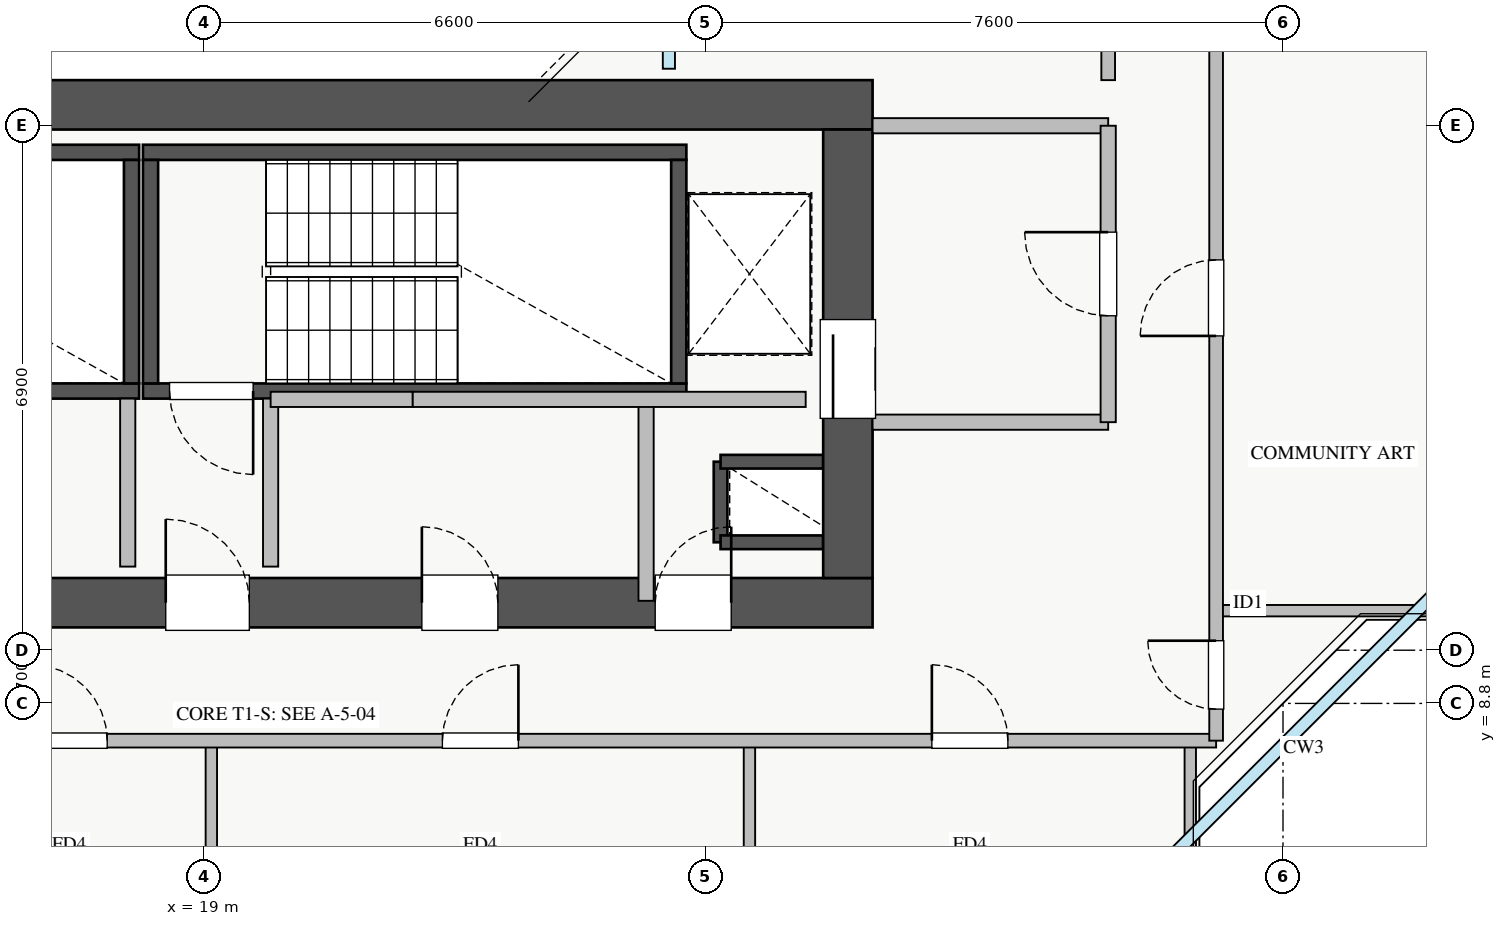
"""IFC4 building model, lengths in metres.
Left out: names, types, materials, properties, quantities, classifications, styles, units other than length and angle.
Written with IfcOpenShell. Run it as: python <this file> out.ifc"""

import sys

from ifc_helpers import new_model, si_unit, direction, frame, frame_2d, origin, place, context, subcontext, project, spatial, rectangle, extrude, source, transform, mapped, element, fill, save


model = new_model("IFC4")
c1 = context("Model", 3, precision=1e-05, world=origin(), true_north=direction((0.0, 1.0)))
c2 = subcontext(c1, "Body", "Model", "MODEL_VIEW")
j1 = project(units=[si_unit("LENGTHUNIT", "METRE"), si_unit("PLANEANGLEUNIT", "RADIAN")], contexts=[c1])
p1 = place(None, origin())
s1 = spatial("IfcSite", under=j1, at=p1, CompositionType="ELEMENT")
p2 = place(p1, origin())
s2 = spatial("IfcBuilding", under=s1, at=p2, CompositionType="ELEMENT")
p3 = place(p2, frame((0.0, 0.0, 176.25)))
s3 = spatial("IfcBuildingStorey", under=s2, at=p3, CompositionType="ELEMENT", Elevation=176.25)
p4 = place(p3, frame((25.8, 10.92, 0.0), z_axis=(0.0, 0.0, 1.0), x_axis=(0.0, 1.0, 0.0)))
e1 = element("IfcWall", 1, at=p4, inside=s3, PredefinedType="SHEAR", context=c2, shape_type="SweptSolid", body=[
    extrude(rectangle(XDim=1.06, YDim=0.18, at=frame_2d((0.53, 0.0))), origin(), (0.0, 0.0, 1.0), 3.07),
])
for number, where, z_axis, x_axis in (
    (2, (25.8, 11.98, 0.0), (0.0, 0.0, 1.0), (1.0, 0.0, 0.0)),
    (3, (25.8, 10.92, 0.0), (0.0, 0.0, 1.0), (1.0, 0.0, 0.0)),
):
    element("IfcWall", number, at=place(p3, frame(where, z_axis=z_axis, x_axis=x_axis)), inside=s3, PredefinedType="SHEAR", context=c2, shape_type="SweptSolid", body=[
        extrude(rectangle(XDim=1.35, YDim=0.18, at=frame_2d((0.675, 0.0))), origin(), (0.0, 0.0, 1.0), 3.07),
    ])
p5 = place(p3, frame((10.85, 12.91, 0.0), z_axis=(0.0, 0.0, 1.0), x_axis=(1.0, 0.0, 0.0)))
e4 = element("IfcWall", 4, at=p5, inside=s3, PredefinedType="SHEAR", context=c2, shape_type="SweptSolid", body=[
    extrude(rectangle(XDim=7.3, YDim=0.2, at=frame_2d((3.65, 0.0))), origin(), (0.0, 0.0, 1.0), 3.25),
])
p6 = place(p5, frame((0.35, 0.0, 0.0)))
e5 = element("IfcOpeningElement", 5, at=p6, cuts=e4, PredefinedType="OPENING", context=c2, shape_type="SweptSolid", body=[
    extrude(rectangle(XDim=1.1, YDim=2.05, at=frame_2d((0.55, 1.025))), frame((0.0, 0.11, 0.0), z_axis=(0.0, -1.0, 0.0), x_axis=(1.0, 0.0, 0.0)), (0.0, 0.0, 1.0), 0.22),
])
p7 = place(p3, frame((10.85, 16.05, 0.0), z_axis=(0.0, 0.0, 1.0), x_axis=(1.0, 0.0, 0.0)))
e6 = element("IfcWall", 6, at=p7, inside=s3, PredefinedType="SHEAR", context=c2, shape_type="SweptSolid", body=[
    extrude(rectangle(XDim=7.3, YDim=0.2, at=frame_2d((3.65, 0.0))), origin(), (0.0, 0.0, 1.0), 3.25),
])
p8 = place(p3, frame((18.05, 13.01, 0.0), z_axis=(0.0, 0.0, 1.0), x_axis=(0.0, 1.0, 0.0)))
e7 = element("IfcWall", 7, at=p8, inside=s3, PredefinedType="SHEAR", context=c2, shape_type="SweptSolid", body=[
    extrude(rectangle(XDim=2.94, YDim=0.2, at=frame_2d((1.47, 0.0))), origin(), (0.0, 0.0, 1.0), 3.25),
])
p9 = place(p3, frame((18.2, 12.91, 0.0), z_axis=(0.0, 0.0, 1.0), x_axis=(1.0, 0.0, 0.0)))
e8 = element("IfcWall", 8, at=p9, inside=s3, PredefinedType="SHEAR", context=c2, shape_type="SweptSolid", body=[
    extrude(rectangle(XDim=7.15, YDim=0.2, at=frame_2d((3.575, 0.0))), origin(), (0.0, 0.0, 1.0), 3.25),
])
p10 = place(p9, frame((0.35, 0.0, 0.0)))
e9 = element("IfcOpeningElement", 9, at=p10, cuts=e8, PredefinedType="OPENING", context=c2, shape_type="SweptSolid", body=[
    extrude(rectangle(XDim=1.1, YDim=2.05, at=frame_2d((0.55, 1.025))), frame((0.0, 0.11, 0.0), z_axis=(0.0, -1.0, 0.0), x_axis=(1.0, 0.0, 0.0)), (0.0, 0.0, 1.0), 0.22),
])
p11 = place(p3, frame((18.2, 16.05, 0.0), z_axis=(0.0, 0.0, 1.0), x_axis=(1.0, 0.0, 0.0)))
e10 = element("IfcWall", 10, at=p11, inside=s3, PredefinedType="SHEAR", context=c2, shape_type="SweptSolid", body=[
    extrude(rectangle(XDim=7.15, YDim=0.2, at=frame_2d((3.575, 0.0))), origin(), (0.0, 0.0, 1.0), 3.25),
])
for number, where, z_axis, x_axis in (
    (11, (18.3, 13.01, 0.0), (0.0, 0.0, 1.0), (0.0, 1.0, 0.0)),
    (12, (25.25, 13.01, 0.0), (0.0, 0.0, 1.0), (0.0, 1.0, 0.0)),
):
    element("IfcWall", number, at=place(p3, frame(where, z_axis=z_axis, x_axis=x_axis)), inside=s3, PredefinedType="SHEAR", context=c2, shape_type="SweptSolid", body=[
        extrude(rectangle(XDim=2.94, YDim=0.2, at=frame_2d((1.47, 0.0))), origin(), (0.0, 0.0, 1.0), 3.25),
    ])
p12 = place(p3, frame((10.2, 10.125, 0.0), z_axis=(0.0, 0.0, 1.0), x_axis=(1.0, 0.0, 0.0)))
e13 = element("IfcWall", 13, at=p12, inside=s3, PredefinedType="SHEAR", context=c2, shape_type="SweptSolid", body=[
    extrude(rectangle(XDim=17.6, YDim=0.65, at=frame_2d((8.8, 0.0))), origin(), (0.0, 0.0, 1.0), 3.25),
])
p13 = place(p12, frame((1.15, 0.0, 0.0)))
e14 = element("IfcOpeningElement", 14, at=p13, cuts=e13, PredefinedType="OPENING", context=c2, shape_type="SweptSolid", body=[
    extrude(rectangle(XDim=1.1, YDim=2.05, at=frame_2d((0.55, 1.025))), frame((0.0, 0.335, 0.0), z_axis=(0.0, -1.0, 0.0), x_axis=(1.0, 0.0, 0.0)), (0.0, 0.0, 1.0), 0.67),
])
p14 = place(p12, frame((8.3, 0.0, 0.0)))
e15 = element("IfcOpeningElement", 15, at=p14, cuts=e13, PredefinedType="OPENING", context=c2, shape_type="SweptSolid", body=[
    extrude(rectangle(XDim=1.1, YDim=2.05, at=frame_2d((0.55, 1.025))), frame((0.0, 0.335, 0.0), z_axis=(0.0, -1.0, 0.0), x_axis=(1.0, 0.0, 0.0)), (0.0, 0.0, 1.0), 0.67),
])
p15 = place(p12, frame((4.9, 0.0, 0.0)))
e16 = element("IfcOpeningElement", 16, at=p15, cuts=e13, PredefinedType="OPENING", context=c2, shape_type="SweptSolid", body=[
    extrude(rectangle(XDim=1.1, YDim=2.05, at=frame_2d((0.55, 1.025))), frame((0.0, 0.335, 0.0), z_axis=(0.0, -1.0, 0.0), x_axis=(1.0, 0.0, 0.0)), (0.0, 0.0, 1.0), 0.67),
])
p16 = place(p12, frame((14.74, 0.0, 0.0)))
e17 = element("IfcOpeningElement", 17, at=p16, cuts=e13, PredefinedType="OPENING", context=c2, shape_type="SweptSolid", body=[
    extrude(rectangle(XDim=1.0, YDim=2.05, at=frame_2d((0.5, 1.025))), frame((0.0, 0.335, 0.0), z_axis=(0.0, -1.0, 0.0), x_axis=(1.0, 0.0, 0.0)), (0.0, 0.0, 1.0), 0.67),
])
p17 = place(p12, frame((11.67, 0.0, 0.0)))
e18 = element("IfcOpeningElement", 18, at=p17, cuts=e13, PredefinedType="OPENING", context=c2, shape_type="SweptSolid", body=[
    extrude(rectangle(XDim=1.0, YDim=2.05, at=frame_2d((0.5, 1.025))), frame((0.0, 0.335, 0.0), z_axis=(0.0, -1.0, 0.0), x_axis=(1.0, 0.0, 0.0)), (0.0, 0.0, 1.0), 0.67),
])
p18 = place(p3, frame((10.2, 16.675, 0.0), z_axis=(0.0, 0.0, 1.0), x_axis=(1.0, 0.0, 0.0)))
e19 = element("IfcWall", 19, at=p18, inside=s3, PredefinedType="SHEAR", context=c2, shape_type="SweptSolid", body=[
    extrude(rectangle(XDim=17.6, YDim=0.65, at=frame_2d((8.8, 0.0))), origin(), (0.0, 0.0, 1.0), 3.25),
])
p19 = place(p3, frame((27.475, 10.45, 0.0), z_axis=(0.0, 0.0, 1.0), x_axis=(0.0, 1.0, 0.0)))
e20 = element("IfcWall", 20, at=p19, inside=s3, PredefinedType="SHEAR", context=c2, shape_type="SweptSolid", body=[
    extrude(rectangle(XDim=5.9, YDim=0.65, at=frame_2d((2.95, 0.0))), origin(), (0.0, 0.0, 1.0), 3.25),
])
p20 = place(p19, frame((2.1, 0.0, 0.0)))
e21 = element("IfcOpeningElement", 21, at=p20, cuts=e20, PredefinedType="OPENING", context=c2, shape_type="SweptSolid", body=[
    extrude(rectangle(XDim=1.3, YDim=2.05, at=frame_2d((0.65, 1.025))), frame((0.0, 0.335, 0.0), z_axis=(0.0, -1.0, 0.0), x_axis=(1.0, 0.0, 0.0)), (0.0, 0.0, 1.0), 0.67),
])
for number, where, z_axis, x_axis in (
    (22, (27.8, 16.4, 0.0), (0.0, 0.0, 1.0), (1.0, 0.0, 0.0)),
    (23, (27.8, 12.5, 0.0), (0.0, 0.0, 1.0), (1.0, 0.0, 0.0)),
):
    element("IfcWall", number, at=place(p3, frame(where, z_axis=z_axis, x_axis=x_axis)), inside=s3, PredefinedType="PARTITIONING", context=c2, shape_type="SweptSolid", body=[
        extrude(rectangle(XDim=3.1, YDim=0.2, at=frame_2d((1.55, 0.0))), origin(), (0.0, 0.0, 1.0), 3.07),
    ])
p21 = place(p3, frame((30.9, 12.5, 0.0), z_axis=(0.0, 0.0, 1.0), x_axis=(0.0, 1.0, 0.0)))
e24 = element("IfcWall", 24, at=p21, inside=s3, PredefinedType="PARTITIONING", context=c2, shape_type="SweptSolid", body=[
    extrude(rectangle(XDim=3.9, YDim=0.2, at=frame_2d((1.95, 0.0))), origin(), (0.0, 0.0, 1.0), 3.07),
])
p22 = place(p21, frame((1.4, 0.0, 0.0)))
e25 = element("IfcOpeningElement", 25, at=p22, cuts=e24, PredefinedType="OPENING", context=c2, shape_type="SweptSolid", body=[
    extrude(rectangle(XDim=1.1, YDim=2.05, at=frame_2d((0.55, 1.025))), frame((0.0, 0.11, 0.0), z_axis=(0.0, -1.0, 0.0), x_axis=(1.0, 0.0, 0.0)), (0.0, 0.0, 1.0), 0.22),
])
for number, where, z_axis, x_axis in (
    (26, (18.0, 10.6, 0.0), (0.0, 0.0, 1.0), (0.0, 1.0, 0.0)),
    (27, (19.88, 10.6, 0.0), (0.0, 0.0, 1.0), (0.0, 1.0, 0.0)),
):
    element("IfcWall", number, at=place(p3, frame(where, z_axis=z_axis, x_axis=x_axis)), inside=s3, PredefinedType="PARTITIONING", context=c2, shape_type="SweptSolid", body=[
        extrude(rectangle(XDim=2.21, YDim=0.2, at=frame_2d((1.105, 0.0))), origin(), (0.0, 0.0, 1.0), 3.07),
    ])
p23 = place(p3, frame((24.82, 10.15, 0.0), z_axis=(0.0, 0.0, 1.0), x_axis=(0.0, 1.0, 0.0)))
e28 = element("IfcWall", 28, at=p23, inside=s3, PredefinedType="PARTITIONING", context=c2, shape_type="SweptSolid", body=[
    extrude(rectangle(XDim=2.65, YDim=0.2, at=frame_2d((1.325, 0.0))), origin(), (0.0, 0.0, 1.0), 3.07),
])
p24 = place(p3, frame((19.88, 12.8, 0.0), z_axis=(0.0, 0.0, 1.0), x_axis=(1.0, 0.0, 0.0)))
e29 = element("IfcWall", 29, at=p24, inside=s3, PredefinedType="PARTITIONING", context=c2, shape_type="SweptSolid", body=[
    extrude(rectangle(XDim=1.87, YDim=0.2, at=frame_2d((0.935, 0.0))), origin(), (0.0, 0.0, 1.0), 3.07),
])
p25 = place(p3, frame((21.75, 12.8, 0.0), z_axis=(0.0, 0.0, 1.0), x_axis=(1.0, 0.0, 0.0)))
e30 = element("IfcWall", 30, at=p25, inside=s3, PredefinedType="PARTITIONING", context=c2, shape_type="SweptSolid", body=[
    extrude(rectangle(XDim=5.17, YDim=0.2, at=frame_2d((2.585, 0.0))), origin(), (0.0, 0.0, 1.0), 3.07),
])
p26 = place(p3, frame((19.1, 5.35, 0.0), z_axis=(0.0, 0.0, 1.0), x_axis=(0.0, 1.0, 0.0)))
e31 = element("IfcWall", 31, at=p26, inside=s3, PredefinedType="PARTITIONING", context=c2, shape_type="SweptSolid", body=[
    extrude(rectangle(XDim=2.96, YDim=0.15, at=frame_2d((1.48, 0.0))), origin(), (0.0, 0.0, 1.0), 2.815),
])
for number, where, z_axis, x_axis in (
    (32, (26.18, 5.35, 0.0), (0.0, 0.0, 1.0), (0.0, 1.0, 0.0)),
    (33, (31.98, 5.35, 0.0), (0.0, 0.0, 1.0), (0.0, 1.0, 0.0)),
):
    element("IfcWall", number, at=place(p3, frame(where, z_axis=z_axis, x_axis=x_axis)), inside=s3, PredefinedType="PARTITIONING", context=c2, shape_type="SweptSolid", body=[
        extrude(rectangle(XDim=2.96, YDim=0.15, at=frame_2d((1.48, 0.0))), origin(), (0.0, 0.0, 1.0), 3.07),
    ])
p27 = place(p3, frame((8.78, 8.31, 0.0), z_axis=(0.0, 0.0, 1.0), x_axis=(1.0, 0.0, 0.0)))
e34 = element("IfcWall", 34, at=p27, inside=s3, PredefinedType="PARTITIONING", context=c2, shape_type="SweptSolid", body=[
    extrude(rectangle(XDim=23.54, YDim=0.18, at=frame_2d((11.77, 0.0))), origin(), (0.0, 0.0, 1.0), 3.07),
])
p28 = place(p27, frame((2.79, 0.0, 0.0)))
e35 = element("IfcOpeningElement", 35, at=p28, cuts=e34, PredefinedType="OPENING", context=c2, shape_type="SweptSolid", body=[
    extrude(rectangle(XDim=1.0, YDim=2.05, at=frame_2d((0.5, 1.025))), frame((0.0, 0.1, 0.0), z_axis=(0.0, -1.0, 0.0), x_axis=(1.0, 0.0, 0.0)), (0.0, 0.0, 1.0), 0.2),
])
p29 = place(p27, frame((7.95, 0.0, 0.0)))
e36 = element("IfcOpeningElement", 36, at=p29, cuts=e34, PredefinedType="OPENING", context=c2, shape_type="SweptSolid", body=[
    extrude(rectangle(XDim=1.0, YDim=2.05, at=frame_2d((0.5, 1.025))), frame((0.0, 0.1, 0.0), z_axis=(0.0, -1.0, 0.0), x_axis=(1.0, 0.0, 0.0)), (0.0, 0.0, 1.0), 0.2),
])
p30 = place(p27, frame((13.36, 0.0, 0.0)))
e37 = element("IfcOpeningElement", 37, at=p30, cuts=e34, PredefinedType="OPENING", context=c2, shape_type="SweptSolid", body=[
    extrude(rectangle(XDim=1.0, YDim=2.05, at=frame_2d((0.5, 1.025))), frame((0.0, 0.1, 0.0), z_axis=(0.0, -1.0, 0.0), x_axis=(1.0, 0.0, 0.0)), (0.0, 0.0, 1.0), 0.2),
])
p31 = place(p27, frame((19.8, 0.0, 0.0)))
e38 = element("IfcOpeningElement", 38, at=p31, cuts=e34, PredefinedType="OPENING", context=c2, shape_type="SweptSolid", body=[
    extrude(rectangle(XDim=1.0, YDim=2.05, at=frame_2d((0.5, 1.025))), frame((0.0, 0.1, 0.0), z_axis=(0.0, -1.0, 0.0), x_axis=(1.0, 0.0, 0.0)), (0.0, 0.0, 1.0), 0.2),
])
p32 = place(p3, frame((32.32, 10.02, 0.0), z_axis=(0.0, 0.0, 1.0), x_axis=(1.0, 0.0, 0.0)))
e39 = element("IfcWall", 39, at=p32, inside=s3, PredefinedType="PARTITIONING", context=c2, shape_type="SweptSolid", body=[
    extrude(rectangle(XDim=3.28, YDim=0.15, at=frame_2d((1.64, 0.0))), origin(), (0.0, 0.0, 1.0), 3.07),
])
p33 = place(p3, frame((32.32, 8.31, 0.0), z_axis=(0.0, 0.0, 1.0), x_axis=(0.0, 1.0, 0.0)))
e40 = element("IfcWall", 40, at=p33, inside=s3, PredefinedType="PARTITIONING", context=c2, shape_type="SweptSolid", body=[
    extrude(rectangle(XDim=29.34, YDim=0.18, at=frame_2d((14.67, 0.0))), origin(), (0.0, 0.0, 1.0), 3.07),
])
p34 = place(p33, frame((28.045, 0.0, 0.0)))
e41 = element("IfcOpeningElement", 41, at=p34, cuts=e40, PredefinedType="OPENING", context=c2, shape_type="SweptSolid", body=[
    extrude(rectangle(XDim=0.9, YDim=2.05, at=frame_2d((0.45, 1.025))), frame((0.0, 0.1, 0.0), z_axis=(0.0, -1.0, 0.0), x_axis=(1.0, 0.0, 0.0)), (0.0, 0.0, 1.0), 0.2),
])
p35 = place(p33, frame((0.415, 0.0, 0.0)))
e42 = element("IfcOpeningElement", 42, at=p35, cuts=e40, PredefinedType="OPENING", context=c2, shape_type="SweptSolid", body=[
    extrude(rectangle(XDim=0.9, YDim=2.05, at=frame_2d((0.45, 1.025))), frame((0.0, 0.1, 0.0), z_axis=(0.0, -1.0, 0.0), x_axis=(1.0, 0.0, 0.0)), (0.0, 0.0, 1.0), 0.2),
])
p36 = place(p33, frame((5.325, 0.0, 0.0)))
e43 = element("IfcOpeningElement", 43, at=p36, cuts=e40, PredefinedType="OPENING", context=c2, shape_type="SweptSolid", body=[
    extrude(rectangle(XDim=1.0, YDim=2.05, at=frame_2d((0.5, 1.025))), frame((0.0, 0.1, 0.0), z_axis=(0.0, -1.0, 0.0), x_axis=(1.0, 0.0, 0.0)), (0.0, 0.0, 1.0), 0.2),
])
p37 = place(p33, frame((14.095, 0.0, 0.0)))
e44 = element("IfcOpeningElement", 44, at=p37, cuts=e40, PredefinedType="OPENING", context=c2, shape_type="SweptSolid", body=[
    extrude(rectangle(XDim=1.0, YDim=2.05, at=frame_2d((0.5, 1.025))), frame((0.0, 0.1, 0.0), z_axis=(0.0, -1.0, 0.0), x_axis=(1.0, 0.0, 0.0)), (0.0, 0.0, 1.0), 0.2),
])
p38 = place(p33, frame((22.96, 0.0, 0.0)))
e45 = element("IfcOpeningElement", 45, at=p38, cuts=e40, PredefinedType="OPENING", context=c2, shape_type="SweptSolid", body=[
    extrude(rectangle(XDim=1.0, YDim=2.05, at=frame_2d((0.5, 1.025))), frame((0.0, 0.1, 0.0), z_axis=(0.0, -1.0, 0.0), x_axis=(1.0, 0.0, 0.0)), (0.0, 0.0, 1.0), 0.2),
])
p39 = place(p3, frame((30.9, 17.0, 0.0), z_axis=(0.0, 0.0, 1.0), x_axis=(0.0, 1.0, 0.0)))
e46 = element("IfcWall", 46, at=p39, inside=s3, PredefinedType="PARTITIONING", context=c2, shape_type="SweptSolid", body=[
    extrude(rectangle(XDim=12.0, YDim=0.18, at=frame_2d((6.0, 0.0))), origin(), (0.0, 0.0, 1.0), 3.07),
])
p40 = place(p39, frame((2.36, 0.0, 0.0)))
e47 = element("IfcOpeningElement", 47, at=p40, cuts=e46, PredefinedType="OPENING", context=c2, shape_type="SweptSolid", body=[
    extrude(rectangle(XDim=1.0, YDim=2.05, at=frame_2d((0.5, 1.025))), frame((0.0, 0.1, 0.0), z_axis=(0.0, -1.0, 0.0), x_axis=(1.0, 0.0, 0.0)), (0.0, 0.0, 1.0), 0.2),
])
m1 = source(origin(), c2, "Body", "SweptSolid", [
    extrude(rectangle(XDim=1.3, YDim=2.05, at=frame_2d((0.65, 1.025))), frame((0.0, 0.025, 0.0), z_axis=(0.0, -1.0, 0.0), x_axis=(1.0, 0.0, 0.0)), (0.0, 0.0, 1.0), 0.05),
])
p41 = place(p20, origin())
e48 = element("IfcDoor", 48, at=p41, inside=s3, OperationType="SLIDING_TO_RIGHT", PredefinedType="DOOR", context=c2, shape_type="MappedRepresentation", body=[
    mapped(m1, transform((0.0, 0.0, 0.0), x_axis=(1.0, 0.0, 0.0), y_axis=(0.0, 1.0, 0.0), z_axis=(0.0, 0.0, 1.0), scale=1.0)),
])
fill(e21, e48)
m2 = source(origin(), c2, "Body", "SweptSolid", [
    extrude(rectangle(XDim=1.1, YDim=2.05, at=frame_2d((0.55, 1.025))), frame((0.0, 0.025, 0.0), z_axis=(0.0, -1.0, 0.0), x_axis=(1.0, 0.0, 0.0)), (0.0, 0.0, 1.0), 0.05),
])
p42 = place(p14, origin())
e49 = element("IfcDoor", 49, at=p42, inside=s3, OperationType="SINGLE_SWING_LEFT", PredefinedType="DOOR", context=c2, shape_type="MappedRepresentation", body=[
    mapped(m2, transform((0.0, 0.0, 0.0), x_axis=(1.0, 0.0, 0.0), y_axis=(0.0, 1.0, 0.0), z_axis=(0.0, 0.0, 1.0), scale=1.0)),
])
fill(e15, e49)
p43 = place(p10, frame((1.1, 0.0, 0.0), z_axis=(0.0, 0.0, 1.0), x_axis=(-1.0, 0.0, 0.0)))
e50 = element("IfcDoor", 50, at=p43, inside=s3, OperationType="SINGLE_SWING_RIGHT", PredefinedType="DOOR", context=c2, shape_type="MappedRepresentation", body=[
    mapped(m2, transform((0.0, 0.0, 0.0), x_axis=(1.0, 0.0, 0.0), y_axis=(0.0, 1.0, 0.0), z_axis=(0.0, 0.0, 1.0), scale=1.0)),
])
fill(e9, e50)
m3 = source(origin(), c2, "Body", "SweptSolid", [
    extrude(rectangle(XDim=1.0, YDim=2.05, at=frame_2d((0.5, 1.025))), frame((0.0, 0.025, 0.0), z_axis=(0.0, -1.0, 0.0), x_axis=(1.0, 0.0, 0.0)), (0.0, 0.0, 1.0), 0.05),
])
p44 = place(p16, origin())
e51 = element("IfcDoor", 51, at=p44, inside=s3, OperationType="SINGLE_SWING_RIGHT", PredefinedType="DOOR", context=c2, shape_type="MappedRepresentation", body=[
    mapped(m3, transform((0.0, 0.0, 0.0), x_axis=(1.0, 0.0, 0.0), y_axis=(0.0, 1.0, 0.0), z_axis=(0.0, 0.0, 1.0), scale=1.0)),
])
fill(e17, e51)
p45 = place(p17, origin())
e52 = element("IfcDoor", 52, at=p45, inside=s3, OperationType="SINGLE_SWING_LEFT", PredefinedType="DOOR", context=c2, shape_type="MappedRepresentation", body=[
    mapped(m3, transform((0.0, 0.0, 0.0), x_axis=(1.0, 0.0, 0.0), y_axis=(0.0, 1.0, 0.0), z_axis=(0.0, 0.0, 1.0), scale=1.0)),
])
fill(e18, e52)
p46 = place(p22, origin())
e53 = element("IfcDoor", 53, at=p46, inside=s3, OperationType="SINGLE_SWING_RIGHT", PredefinedType="DOOR", context=c2, shape_type="MappedRepresentation", body=[
    mapped(m2, transform((0.0, 0.0, 0.0), x_axis=(1.0, 0.0, 0.0), y_axis=(0.0, 1.0, 0.0), z_axis=(0.0, 0.0, 1.0), scale=1.0)),
])
fill(e25, e53)
p47 = place(p29, origin())
e54 = element("IfcDoor", 54, at=p47, inside=s3, OperationType="SINGLE_SWING_LEFT", PredefinedType="DOOR", context=c2, shape_type="MappedRepresentation", body=[
    mapped(m3, transform((0.0, 0.0, 0.0), x_axis=(1.0, 0.0, 0.0), y_axis=(0.0, 1.0, 0.0), z_axis=(0.0, 0.0, 1.0), scale=1.0)),
])
fill(e36, e54)
p48 = place(p30, origin())
e55 = element("IfcDoor", 55, at=p48, inside=s3, OperationType="SINGLE_SWING_RIGHT", PredefinedType="DOOR", context=c2, shape_type="MappedRepresentation", body=[
    mapped(m3, transform((0.0, 0.0, 0.0), x_axis=(1.0, 0.0, 0.0), y_axis=(0.0, 1.0, 0.0), z_axis=(0.0, 0.0, 1.0), scale=1.0)),
])
fill(e37, e55)
p49 = place(p31, origin())
e56 = element("IfcDoor", 56, at=p49, inside=s3, OperationType="SINGLE_SWING_LEFT", PredefinedType="DOOR", context=c2, shape_type="MappedRepresentation", body=[
    mapped(m3, transform((0.0, 0.0, 0.0), x_axis=(1.0, 0.0, 0.0), y_axis=(0.0, 1.0, 0.0), z_axis=(0.0, 0.0, 1.0), scale=1.0)),
])
fill(e38, e56)
m4 = source(origin(), c2, "Body", "SweptSolid", [
    extrude(rectangle(XDim=0.9, YDim=2.05, at=frame_2d((0.45, 1.025))), frame((0.0, 0.025, 0.0), z_axis=(0.0, -1.0, 0.0), x_axis=(1.0, 0.0, 0.0)), (0.0, 0.0, 1.0), 0.05),
])
p50 = place(p35, origin())
e57 = element("IfcDoor", 57, at=p50, inside=s3, OperationType="SINGLE_SWING_RIGHT", PredefinedType="DOOR", context=c2, shape_type="MappedRepresentation", body=[
    mapped(m4, transform((0.0, 0.0, 0.0), x_axis=(1.0, 0.0, 0.0), y_axis=(0.0, 1.0, 0.0), z_axis=(0.0, 0.0, 1.0), scale=1.0)),
])
fill(e42, e57)
p51 = place(p36, origin())
e58 = element("IfcDoor", 58, at=p51, inside=s3, OperationType="SINGLE_SWING_LEFT", PredefinedType="DOOR", context=c2, shape_type="MappedRepresentation", body=[
    mapped(m3, transform((0.0, 0.0, 0.0), x_axis=(1.0, 0.0, 0.0), y_axis=(0.0, 1.0, 0.0), z_axis=(0.0, 0.0, 1.0), scale=1.0)),
])
fill(e43, e58)
save(model, sys.argv[1])
